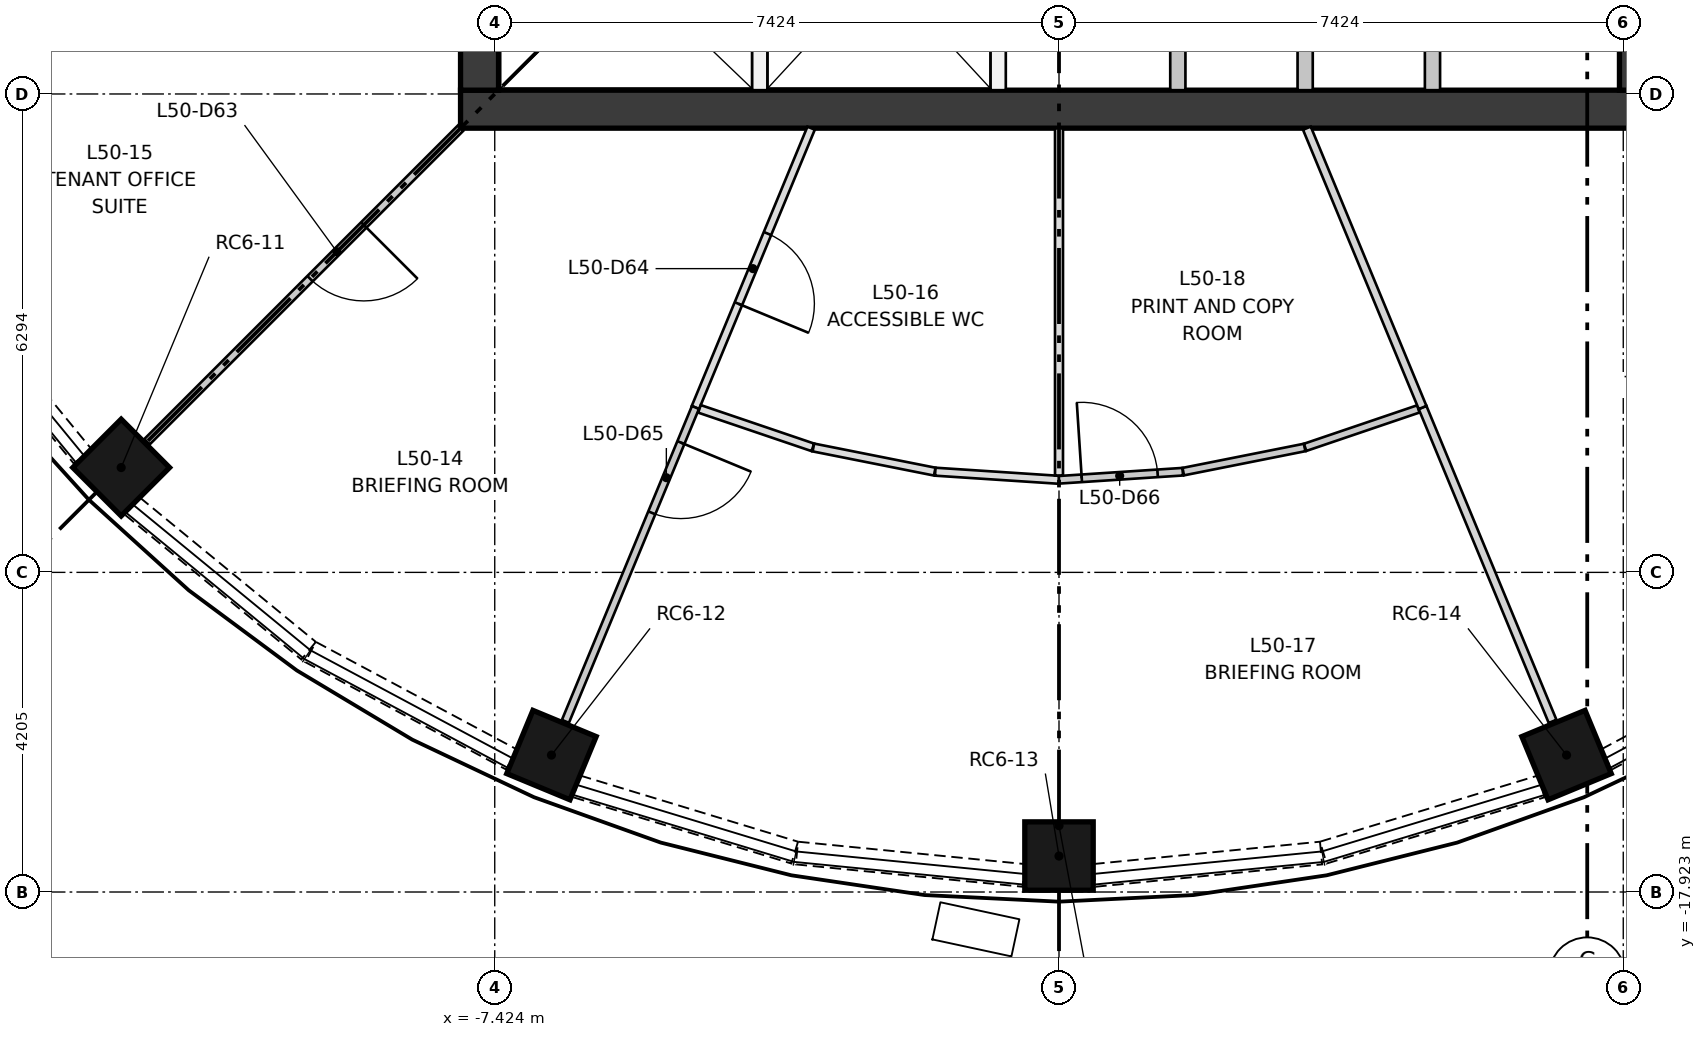
"""IFC4 building model, lengths in metres.
Left out: names, types, materials, properties, quantities, classifications, styles, units other than length and angle.
Written with IfcOpenShell. Run it as: python <this file> out.ifc"""

import sys

from ifc_helpers import new_model, si_unit, direction, frame, frame_2d, origin, origin_2d, place, context, subcontext, project, spatial, rectangle, extrude, element, fill, save


model = new_model("IFC4")
c1 = context("Model", 3, precision=1e-05, world=origin(), true_north=direction((0.0, 1.0)))
c2 = subcontext(c1, "Body", "Model", "MODEL_VIEW")
j1 = project(units=[si_unit("LENGTHUNIT", "METRE"), si_unit("PLANEANGLEUNIT", "RADIAN")], contexts=[c1])
p1 = place(None, origin())
s1 = spatial("IfcSite", under=j1, at=p1, CompositionType="ELEMENT")
p2 = place(p1, origin())
s2 = spatial("IfcBuilding", under=s1, at=p2, CompositionType="ELEMENT")
p3 = place(p2, frame((0.0, 0.0, 187.65)))
s3 = spatial("IfcBuildingStorey", under=s2, at=p3, CompositionType="ELEMENT", Elevation=187.65)
for number, where, z_axis, x_axis in (
    (1, (-12.339, -12.339, 0.5), (0.0, 0.0, 1.0), (-0.707, -0.707, 0.0)),
    (2, (-6.678, -16.122, 0.5), (0.0, 0.0, 1.0), (-0.383, -0.924, 0.0)),
    (3, (0.0, -17.45, 0.5), (0.0, 0.0, 1.0), (0.0, -1.0, 0.0)),
    (4, (6.678, -16.122, 0.5), (0.0, 0.0, 1.0), (0.383, -0.924, 0.0)),
):
    element("IfcColumn", number, at=place(p3, frame(where, z_axis=z_axis, x_axis=x_axis)), inside=s3, PredefinedType="COLUMN", context=c2, shape_type="SweptSolid", body=[
        extrude(rectangle(XDim=0.9, YDim=0.9, at=origin_2d()), origin(), (0.0, 0.0, 1.0), 2.85),
    ])
p4 = place(p3, frame((-7.874, -7.624, 0.0), z_axis=(0.0, 0.0, 1.0), x_axis=(1.0, 0.0, 0.0)))
e5 = element("IfcWall", 5, at=p4, inside=s3, PredefinedType="SHEAR", context=c2, shape_type="SweptSolid", body=[
    extrude(rectangle(XDim=15.748, YDim=0.5, at=frame_2d((7.874, 0.0))), origin(), (0.0, 0.0, 1.0), 3.35),
])
p5 = place(p3, frame((-7.624, -7.374, 0.0), z_axis=(0.0, 0.0, 1.0), x_axis=(0.0, 1.0, 0.0)))
e6 = element("IfcWall", 6, at=p5, inside=s3, PredefinedType="SHEAR", context=c2, shape_type="SweptSolid", body=[
    extrude(rectangle(XDim=14.748, YDim=0.5, at=frame_2d((7.374, 0.0))), origin(), (0.0, 0.0, 1.0), 3.35),
])
p6 = place(p5, frame((6.874, 0.0, 0.0)))
e7 = element("IfcOpeningElement", 7, at=p6, cuts=e6, PredefinedType="OPENING", context=c2, shape_type="SweptSolid", body=[
    extrude(rectangle(XDim=1.0, YDim=2.1, at=frame_2d((0.5, 1.05))), frame((0.0, 0.26, 0.0), z_axis=(0.0, -1.0, 0.0), x_axis=(1.0, 0.0, 0.0)), (0.0, 0.0, 1.0), 0.52),
])
p7 = place(p5, frame((3.75, 0.0, 0.0)))
e8 = element("IfcOpeningElement", 8, at=p7, cuts=e6, PredefinedType="OPENING", context=c2, shape_type="SweptSolid", body=[
    extrude(rectangle(XDim=1.8, YDim=2.1, at=frame_2d((0.9, 1.05))), frame((0.0, 0.26, 0.0), z_axis=(0.0, -1.0, 0.0), x_axis=(1.0, 0.0, 0.0)), (0.0, 0.0, 1.0), 0.52),
])
p8 = place(p5, frame((9.198, 0.0, 0.0)))
e9 = element("IfcOpeningElement", 9, at=p8, cuts=e6, PredefinedType="OPENING", context=c2, shape_type="SweptSolid", body=[
    extrude(rectangle(XDim=1.8, YDim=2.1, at=frame_2d((0.9, 1.05))), frame((0.0, 0.26, 0.0), z_axis=(0.0, -1.0, 0.0), x_axis=(1.0, 0.0, 0.0)), (0.0, 0.0, 1.0), 0.52),
])
p9 = place(p3, frame((7.624, -7.374, 0.0), z_axis=(0.0, 0.0, 1.0), x_axis=(0.0, 1.0, 0.0)))
e10 = element("IfcWall", 10, at=p9, inside=s3, PredefinedType="SHEAR", context=c2, shape_type="SweptSolid", body=[
    extrude(rectangle(XDim=14.748, YDim=0.5, at=frame_2d((7.374, 0.0))), origin(), (0.0, 0.0, 1.0), 3.35),
])
p10 = place(p9, frame((6.874, 0.0, 0.0)))
e11 = element("IfcOpeningElement", 11, at=p10, cuts=e10, PredefinedType="OPENING", context=c2, shape_type="SweptSolid", body=[
    extrude(rectangle(XDim=1.0, YDim=2.1, at=frame_2d((0.5, 1.05))), frame((0.0, 0.26, 0.0), z_axis=(0.0, -1.0, 0.0), x_axis=(1.0, 0.0, 0.0)), (0.0, 0.0, 1.0), 0.52),
])
p11 = place(p9, frame((3.75, 0.0, 0.0)))
e12 = element("IfcOpeningElement", 12, at=p11, cuts=e10, PredefinedType="OPENING", context=c2, shape_type="SweptSolid", body=[
    extrude(rectangle(XDim=1.8, YDim=2.1, at=frame_2d((0.9, 1.05))), frame((0.0, 0.26, 0.0), z_axis=(0.0, -1.0, 0.0), x_axis=(1.0, 0.0, 0.0)), (0.0, 0.0, 1.0), 0.52),
])
p12 = place(p9, frame((9.198, 0.0, 0.0)))
e13 = element("IfcOpeningElement", 13, at=p12, cuts=e10, PredefinedType="OPENING", context=c2, shape_type="SweptSolid", body=[
    extrude(rectangle(XDim=1.8, YDim=2.1, at=frame_2d((0.9, 1.05))), frame((0.0, 0.26, 0.0), z_axis=(0.0, -1.0, 0.0), x_axis=(1.0, 0.0, 0.0)), (0.0, 0.0, 1.0), 0.52),
])
for number, where, z_axis, x_axis in (
    (14, (-3.937, -7.374, 0.0), (0.0, 0.0, 1.0), (0.0, 1.0, 0.0)),
    (15, (-0.8, -7.374, 0.0), (0.0, 0.0, 1.0), (0.0, 1.0, 0.0)),
    (16, (1.563, -7.374, 0.0), (0.0, 0.0, 1.0), (0.0, 1.0, 0.0)),
    (17, (3.239, -7.374, 0.0), (0.0, 0.0, 1.0), (0.0, 1.0, 0.0)),
    (18, (4.914, -7.374, 0.0), (0.0, 0.0, 1.0), (0.0, 1.0, 0.0)),
):
    element("IfcWall", number, at=place(p3, frame(where, z_axis=z_axis, x_axis=x_axis)), inside=s3, PredefinedType="PARTITIONING", context=c2, shape_type="SweptSolid", body=[
        extrude(rectangle(XDim=3.2, YDim=0.2, at=frame_2d((1.6, 0.0))), origin(), (0.0, 0.0, 1.0), 3.0),
    ])
for number, where, z_axis, x_axis in (
    (19, (-14.749, -9.873, 0.0), (0.0, 0.0, 1.0), (0.634, -0.773, 0.0)),
    (20, (-12.191, -12.846, 0.0), (0.0, 0.0, 1.0), (0.773, -0.634, 0.0)),
):
    element("IfcWall", number, at=place(p3, frame(where, z_axis=z_axis, x_axis=x_axis)), inside=s3, PredefinedType="SOLIDWALL", context=c2, shape_type="SweptSolid", body=[
        extrude(rectangle(XDim=2.999, YDim=0.3, at=frame_2d((1.5, 0.0))), origin(), (0.0, 0.0, 1.0), 0.9),
    ])
p13 = place(p3, frame((-9.848, -14.765, 0.0), z_axis=(0.0, 0.0, 1.0), x_axis=(0.881827169278, -0.471572734074, 0.0)))
e21 = element("IfcWall", 21, at=p13, inside=s3, PredefinedType="SOLIDWALL", context=c2, shape_type="SweptSolid", body=[
    extrude(rectangle(XDim=2.998, YDim=0.3, at=frame_2d((1.499, 0.0))), origin(), (0.0, 0.0, 1.0), 0.9),
])
p14 = place(p3, frame((-6.347, -16.533, 0.0), z_axis=(0.0, 0.0, 1.0), x_axis=(0.95687774785, -0.290490921835, 0.0)))
e22 = element("IfcWall", 22, at=p14, inside=s3, PredefinedType="SOLIDWALL", context=c2, shape_type="SweptSolid", body=[
    extrude(rectangle(XDim=2.999, YDim=0.3, at=frame_2d((1.5, 0.0))), origin(), (0.0, 0.0, 1.0), 0.9),
])
for number, where, z_axis, x_axis in (
    (23, (-3.448, -17.41, 0.0), (0.0, 0.0, 1.0), (0.995, -0.098, 0.0)),
    (24, (0.464, -17.705, 0.0), (0.0, 0.0, 1.0), (0.995, 0.098, 0.0)),
):
    element("IfcWall", number, at=place(p3, frame(where, z_axis=z_axis, x_axis=x_axis)), inside=s3, PredefinedType="SOLIDWALL", context=c2, shape_type="SweptSolid", body=[
        extrude(rectangle(XDim=2.999, YDim=0.3, at=frame_2d((1.499, 0.0))), origin(), (0.0, 0.0, 1.0), 0.9),
    ])
p15 = place(p3, frame((3.477, -17.405, 0.0), z_axis=(0.0, 0.0, 1.0), x_axis=(0.95687774785, 0.290490921835, 0.0)))
e25 = element("IfcWall", 25, at=p15, inside=s3, PredefinedType="SOLIDWALL", context=c2, shape_type="SweptSolid", body=[
    extrude(rectangle(XDim=2.999, YDim=0.3, at=frame_2d((1.5, 0.0))), origin(), (0.0, 0.0, 1.0), 0.9),
])
p16 = place(p3, frame((7.204, -16.179, 0.0), z_axis=(0.0, 0.0, 1.0), x_axis=(0.881827169278, 0.471572734074, 0.0)))
e26 = element("IfcWall", 26, at=p16, inside=s3, PredefinedType="SOLIDWALL", context=c2, shape_type="SweptSolid", body=[
    extrude(rectangle(XDim=2.998, YDim=0.3, at=frame_2d((1.499, 0.0))), origin(), (0.0, 0.0, 1.0), 0.9),
])
p17 = place(p3, frame((-7.874, -7.874, 0.0), z_axis=(0.0, 0.0, 1.0), x_axis=(-0.707106781187, -0.707106781187, 0.0)))
e27 = element("IfcWall", 27, at=p17, inside=s3, PredefinedType="PARTITIONING", context=c2, shape_type="SweptSolid", body=[
    extrude(rectangle(XDim=5.834, YDim=0.1, at=frame_2d((2.917, 0.0))), origin(), (0.0, 0.0, 1.0), 3.0),
])
p18 = place(p17, frame((1.8, 0.0, 0.0)))
e28 = element("IfcOpeningElement", 28, at=p18, cuts=e27, PredefinedType="OPENING", context=c2, shape_type="SweptSolid", body=[
    extrude(rectangle(XDim=1.0, YDim=2.1, at=frame_2d((0.5, 1.05))), frame((0.0, 0.06, 0.0), z_axis=(0.0, -1.0, 0.0), x_axis=(1.0, 0.0, 0.0)), (0.0, 0.0, 1.0), 0.12),
])
p19 = place(p3, frame((-3.261, -7.874, 0.0), z_axis=(0.0, 0.0, 1.0), x_axis=(-0.382666229821, -0.923886657851, 0.0)))
e29 = element("IfcWall", 29, at=p19, inside=s3, PredefinedType="PARTITIONING", context=c2, shape_type="SweptSolid", body=[
    extrude(rectangle(XDim=3.977, YDim=0.105, at=frame_2d((1.989, 0.0))), origin(), (0.0, 0.0, 1.0), 3.0),
])
p20 = place(p19, frame((1.5, 0.0, 0.0)))
e30 = element("IfcOpeningElement", 30, at=p20, cuts=e29, PredefinedType="OPENING", context=c2, shape_type="SweptSolid", body=[
    extrude(rectangle(XDim=1.0, YDim=2.1, at=frame_2d((0.5, 1.05))), frame((0.0, 0.062, 0.0), z_axis=(0.0, -1.0, 0.0), x_axis=(1.0, 0.0, 0.0)), (0.0, 0.0, 1.0), 0.125),
])
p21 = place(p3, frame((-4.783, -11.549, 0.0), z_axis=(0.0, 0.0, 1.0), x_axis=(-0.382710359347, -0.92386837853, 0.0)))
e31 = element("IfcWall", 31, at=p21, inside=s3, PredefinedType="PARTITIONING", context=c2, shape_type="SweptSolid", body=[
    extrude(rectangle(XDim=4.47, YDim=0.1, at=frame_2d((2.235, 0.0))), origin(), (0.0, 0.0, 1.0), 3.0),
])
p22 = place(p21, frame((0.5, 0.0, 0.0)))
e32 = element("IfcOpeningElement", 32, at=p22, cuts=e31, PredefinedType="OPENING", context=c2, shape_type="SweptSolid", body=[
    extrude(rectangle(XDim=1.0, YDim=2.1, at=frame_2d((0.5, 1.05))), frame((0.0, 0.06, 0.0), z_axis=(0.0, -1.0, 0.0), x_axis=(1.0, 0.0, 0.0)), (0.0, 0.0, 1.0), 0.12),
])
p23 = place(p3, frame((-3.239, -12.073, 0.0), z_axis=(0.0, 0.0, 1.0), x_axis=(-0.946902062217, 0.321522136982, 0.0)))
e33 = element("IfcWall", 33, at=p23, inside=s3, PredefinedType="PARTITIONING", context=c2, shape_type="SweptSolid", body=[
    extrude(rectangle(XDim=1.576, YDim=0.105, at=frame_2d((0.788, 0.0))), origin(), (0.0, 0.0, 1.0), 3.0),
])
p24 = place(p3, frame((-1.635, -12.392, 0.0), z_axis=(0.0, 0.0, 1.0), x_axis=(-0.980782034379, 0.195106640172, 0.0)))
e34 = element("IfcWall", 34, at=p24, inside=s3, PredefinedType="PARTITIONING", context=c2, shape_type="SweptSolid", body=[
    extrude(rectangle(XDim=1.628, YDim=0.105, at=frame_2d((0.814, 0.0))), origin(), (0.0, 0.0, 1.0), 3.0),
])
p25 = place(p3, frame((0.0, -12.5, 0.0), z_axis=(0.0, 0.0, 1.0), x_axis=(-0.997859990953, 0.065386837014, 0.0)))
e35 = element("IfcWall", 35, at=p25, inside=s3, PredefinedType="PARTITIONING", context=c2, shape_type="SweptSolid", body=[
    extrude(rectangle(XDim=1.632, YDim=0.105, at=frame_2d((0.816, 0.0))), origin(), (0.0, 0.0, 1.0), 3.0),
])
p26 = place(p3, frame((0.0, -7.874, 0.0), z_axis=(0.0, 0.0, 1.0), x_axis=(0.0, -1.0, 0.0)))
e36 = element("IfcWall", 36, at=p26, inside=s3, PredefinedType="PARTITIONING", context=c2, shape_type="SweptSolid", body=[
    extrude(rectangle(XDim=4.57, YDim=0.105, at=frame_2d((2.285, 0.0))), origin(), (0.0, 0.0, 1.0), 3.0),
])
p27 = place(p3, frame((0.0, -12.5, 0.0), z_axis=(0.0, 0.0, 1.0), x_axis=(0.997860630529, 0.065377075793, 0.0)))
e37 = element("IfcWall", 37, at=p27, inside=s3, PredefinedType="PARTITIONING", context=c2, shape_type="SweptSolid", body=[
    extrude(rectangle(XDim=1.632, YDim=0.1, at=frame_2d((0.816, 0.0))), origin(), (0.0, 0.0, 1.0), 3.0),
])
p28 = place(p27, frame((0.3, 0.0, 0.0)))
e38 = element("IfcOpeningElement", 38, at=p28, cuts=e37, PredefinedType="OPENING", context=c2, shape_type="SweptSolid", body=[
    extrude(rectangle(XDim=1.0, YDim=2.1, at=frame_2d((0.5, 1.05))), frame((0.0, 0.06, 0.0), z_axis=(0.0, -1.0, 0.0), x_axis=(1.0, 0.0, 0.0)), (0.0, 0.0, 1.0), 0.12),
])
p29 = place(p3, frame((1.635, -12.393, 0.0), z_axis=(0.0, 0.0, 1.0), x_axis=(0.980764756379, 0.195193474902, 0.0)))
e39 = element("IfcWall", 39, at=p29, inside=s3, PredefinedType="PARTITIONING", context=c2, shape_type="SweptSolid", body=[
    extrude(rectangle(XDim=1.628, YDim=0.1, at=frame_2d((0.814, 0.0))), origin(), (0.0, 0.0, 1.0), 3.0),
])
p30 = place(p3, frame((3.238, -12.073, 0.0), z_axis=(0.0, 0.0, 1.0), x_axis=(0.946962681405, 0.321343554512, 0.0)))
e40 = element("IfcWall", 40, at=p30, inside=s3, PredefinedType="PARTITIONING", context=c2, shape_type="SweptSolid", body=[
    extrude(rectangle(XDim=1.573, YDim=0.1, at=frame_2d((0.787, 0.0))), origin(), (0.0, 0.0, 1.0), 3.0),
])
p31 = place(p3, frame((4.783, -11.549, 0.0), z_axis=(0.0, 0.0, 1.0), x_axis=(0.382710359347, -0.92386837853, 0.0)))
e41 = element("IfcWall", 41, at=p31, inside=s3, PredefinedType="PARTITIONING", context=c2, shape_type="SweptSolid", body=[
    extrude(rectangle(XDim=4.47, YDim=0.11, at=frame_2d((2.235, 0.0))), origin(), (0.0, 0.0, 1.0), 3.0),
])
p32 = place(p3, frame((3.261, -7.874, 0.0), z_axis=(0.0, 0.0, 1.0), x_axis=(0.382666229821, -0.923886657851, 0.0)))
e42 = element("IfcWall", 42, at=p32, inside=s3, PredefinedType="PARTITIONING", context=c2, shape_type="SweptSolid", body=[
    extrude(rectangle(XDim=3.977, YDim=0.11, at=frame_2d((1.989, 0.0))), origin(), (0.0, 0.0, 1.0), 3.0),
])
p33 = place(p18, origin())
e43 = element("IfcDoor", 43, at=p33, inside=s3, OperationType="SINGLE_SWING_LEFT", PredefinedType="DOOR", context=c2, shape_type="SweptSolid", body=[
    extrude(rectangle(XDim=1.0, YDim=2.1, at=frame_2d((0.5, 1.05))), frame((0.0, 0.025, 0.0), z_axis=(0.0, -1.0, 0.0), x_axis=(1.0, 0.0, 0.0)), (0.0, 0.0, 1.0), 0.05),
])
fill(e28, e43)
p34 = place(p20, origin())
e44 = element("IfcDoor", 44, at=p34, inside=s3, OperationType="SINGLE_SWING_RIGHT", PredefinedType="DOOR", context=c2, shape_type="SweptSolid", body=[
    extrude(rectangle(XDim=1.0, YDim=2.1, at=frame_2d((0.5, 1.05))), frame((0.0, 0.025, 0.0), z_axis=(0.0, -1.0, 0.0), x_axis=(1.0, 0.0, 0.0)), (0.0, 0.0, 1.0), 0.05),
])
fill(e30, e44)
p35 = place(p22, origin())
e45 = element("IfcDoor", 45, at=p35, inside=s3, OperationType="SINGLE_SWING_LEFT", PredefinedType="DOOR", context=c2, shape_type="SweptSolid", body=[
    extrude(rectangle(XDim=1.0, YDim=2.1, at=frame_2d((0.5, 1.05))), frame((0.0, 0.025, 0.0), z_axis=(0.0, -1.0, 0.0), x_axis=(1.0, 0.0, 0.0)), (0.0, 0.0, 1.0), 0.05),
])
fill(e32, e45)
p36 = place(p28, origin())
e46 = element("IfcDoor", 46, at=p36, inside=s3, OperationType="SINGLE_SWING_LEFT", PredefinedType="DOOR", context=c2, shape_type="SweptSolid", body=[
    extrude(rectangle(XDim=1.0, YDim=2.1, at=frame_2d((0.5, 1.05))), frame((0.0, 0.025, 0.0), z_axis=(0.0, -1.0, 0.0), x_axis=(1.0, 0.0, 0.0)), (0.0, 0.0, 1.0), 0.05),
])
fill(e38, e46)
save(model, sys.argv[1])
